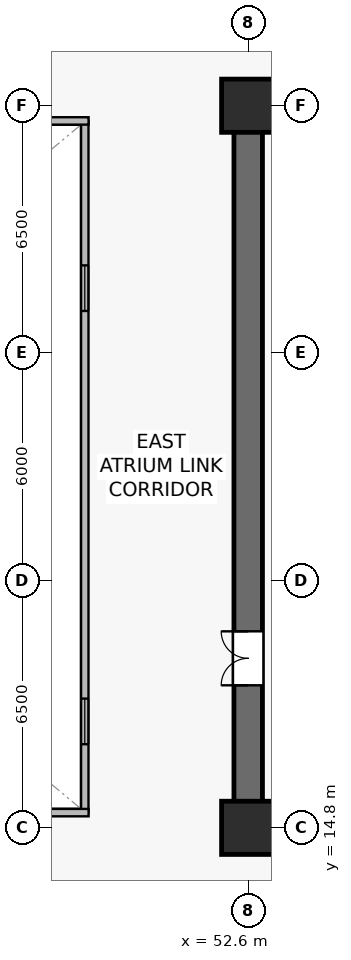
"""IFC4 building model, lengths in metres.
Left out: names, types, materials, properties, quantities, classifications, styles, units other than length and angle.
Written with IfcOpenShell. Run it as: python <this file> out.ifc"""

import sys

from ifc_helpers import new_model, si_unit, direction, frame, frame_2d, origin, origin_2d, place, context, subcontext, project, spatial, rectangle, extrude, source, transform, mapped, element, fill, save


model = new_model("IFC4")
c1 = context("Model", 3, precision=1e-05, world=origin(), true_north=direction((0.0, 1.0)))
c2 = subcontext(c1, "Body", "Model", "MODEL_VIEW")
j1 = project(units=[si_unit("LENGTHUNIT", "METRE"), si_unit("PLANEANGLEUNIT", "RADIAN")], contexts=[c1])
p1 = place(None, origin())
s1 = spatial("IfcSite", under=j1, at=p1, CompositionType="ELEMENT")
p2 = place(p1, origin())
s2 = spatial("IfcBuilding", under=s1, at=p2, CompositionType="ELEMENT")
p3 = place(p2, frame((0.0, 0.0, 53.9)))
s3 = spatial("IfcBuildingStorey", under=s2, at=p3, CompositionType="ELEMENT", Elevation=53.9)
p4 = place(p3, frame((52.225, 14.8, 0.0), z_axis=(0.0, 0.0, 1.0), x_axis=(1.0, 0.0, 0.0)))
e1 = element("IfcWall", 1, at=p4, inside=s3, PredefinedType="SHEAR", context=c2, shape_type="SweptSolid", body=[
    extrude(rectangle(XDim=15.55, YDim=0.75, at=frame_2d((7.775, 0.0))), origin(), (0.0, 0.0, 1.0), 3.78),
])
p5 = place(p3, frame((52.225, 33.8, 0.0), z_axis=(0.0, 0.0, 1.0), x_axis=(1.0, 0.0, 0.0)))
e2 = element("IfcWall", 2, at=p5, inside=s3, PredefinedType="SHEAR", context=c2, shape_type="SweptSolid", body=[
    extrude(rectangle(XDim=15.55, YDim=0.75, at=frame_2d((7.775, 0.0))), origin(), (0.0, 0.0, 1.0), 3.78),
])
p6 = place(p5, frame((6.175, 0.0, 0.0)))
e3 = element("IfcOpeningElement", 3, at=p6, cuts=e2, PredefinedType="OPENING", context=c2, shape_type="SweptSolid", body=[
    extrude(rectangle(XDim=0.95, YDim=2.15, at=frame_2d((0.475, 1.075))), frame((0.0, 0.385, 0.0), z_axis=(0.0, -1.0, 0.0), x_axis=(1.0, 0.0, 0.0)), (0.0, 0.0, 1.0), 0.77),
])
p7 = place(p5, frame((2.635, 0.0, 0.0)))
e4 = element("IfcOpeningElement", 4, at=p7, cuts=e2, PredefinedType="OPENING", context=c2, shape_type="SweptSolid", body=[
    extrude(rectangle(XDim=0.95, YDim=2.15, at=frame_2d((0.475, 1.075))), frame((0.0, 0.385, 0.0), z_axis=(0.0, -1.0, 0.0), x_axis=(1.0, 0.0, 0.0)), (0.0, 0.0, 1.0), 0.77),
])
p8 = place(p3, frame((52.6, 15.175, 0.0), z_axis=(0.0, 0.0, 1.0), x_axis=(0.0, 1.0, 0.0)))
e5 = element("IfcWall", 5, at=p8, inside=s3, PredefinedType="SHEAR", context=c2, shape_type="SweptSolid", body=[
    extrude(rectangle(XDim=18.25, YDim=0.75, at=frame_2d((9.125, 0.0))), origin(), (0.0, 0.0, 1.0), 3.78),
])
p9 = place(p8, frame((3.375, 0.0, 0.0)))
e6 = element("IfcOpeningElement", 6, at=p9, cuts=e5, PredefinedType="OPENING", context=c2, shape_type="SweptSolid", body=[
    extrude(rectangle(XDim=1.42, YDim=2.2, at=frame_2d((0.71, 1.1))), frame((0.0, 0.385, 0.0), z_axis=(0.0, -1.0, 0.0), x_axis=(1.0, 0.0, 0.0)), (0.0, 0.0, 1.0), 0.77),
])
m1 = source(origin(), c2, "Body", "SweptSolid", [
    extrude(rectangle(XDim=1.4, YDim=1.4, at=origin_2d()), origin(), (0.0, 0.0, 1.0), 4.1),
])
for number, where, z_axis, x_axis in (
    (7, (52.6, 14.8, 0.0), (0.0, 0.0, 1.0), (1.0, 0.0, 0.0)),
    (8, (52.6, 33.8, 0.0), (0.0, 0.0, 1.0), (1.0, 0.0, 0.0)),
):
    element("IfcColumn", number, at=place(p3, frame(where, z_axis=z_axis, x_axis=x_axis)), inside=s3, PredefinedType="COLUMN", context=c2, shape_type="MappedRepresentation", body=[
        mapped(m1, transform((0.0, 0.0, 0.0), scale=1.0)),
    ])
p10 = place(p3, frame((48.3, 15.2, 0.0), z_axis=(0.0, 0.0, 1.0), x_axis=(0.0, 1.0, 0.0)))
e9 = element("IfcWall", 9, at=p10, inside=s3, PredefinedType="SOLIDWALL", context=c2, shape_type="SweptSolid", body=[
    extrude(rectangle(XDim=18.2, YDim=0.195, at=frame_2d((9.1, 0.0))), origin(), (0.0, 0.0, 1.0), 3.78),
])
p11 = place(p10, frame((1.8, 0.0, 0.9)))
e10 = element("IfcOpeningElement", 10, at=p11, cuts=e9, PredefinedType="OPENING", context=c2, shape_type="SweptSolid", body=[
    extrude(rectangle(XDim=1.2, YDim=1.35, at=frame_2d((0.6, 0.675))), frame((0.0, 0.107, 0.0), z_axis=(0.0, -1.0, 0.0), x_axis=(1.0, 0.0, 0.0)), (0.0, 0.0, 1.0), 0.215),
])
p12 = place(p10, frame((13.2, 0.0, 0.9)))
e11 = element("IfcOpeningElement", 11, at=p12, cuts=e9, PredefinedType="OPENING", context=c2, shape_type="SweptSolid", body=[
    extrude(rectangle(XDim=1.2, YDim=1.35, at=frame_2d((0.6, 0.675))), frame((0.0, 0.107, 0.0), z_axis=(0.0, -1.0, 0.0), x_axis=(1.0, 0.0, 0.0)), (0.0, 0.0, 1.0), 0.215),
])
for number, where, z_axis, x_axis in (
    (12, (26.4, 15.2, 0.0), (0.0, 0.0, 1.0), (1.0, 0.0, 0.0)),
    (13, (26.4, 33.4, 0.0), (0.0, 0.0, 1.0), (1.0, 0.0, 0.0)),
):
    element("IfcWall", number, at=place(p3, frame(where, z_axis=z_axis, x_axis=x_axis)), inside=s3, PredefinedType="SOLIDWALL", context=c2, shape_type="SweptSolid", body=[
        extrude(rectangle(XDim=22.0, YDim=0.195, at=frame_2d((11.0, 0.0))), origin(), (0.0, 0.0, 1.0), 3.78),
    ])
m2 = source(origin(), c2, "Body", "SweptSolid", [
    extrude(rectangle(XDim=1.2, YDim=1.35, at=frame_2d((0.6, 0.675))), frame((0.0, 0.03, 0.0), z_axis=(0.0, -1.0, 0.0), x_axis=(1.0, 0.0, 0.0)), (0.0, 0.0, 1.0), 0.06),
])
p13 = place(p11, origin())
e14 = element("IfcWindow", 14, at=p13, inside=s3, PartitioningType="SINGLE_PANEL", PredefinedType="WINDOW", context=c2, shape_type="MappedRepresentation", body=[
    mapped(m2, transform((0.0, 0.0, 0.0), scale=1.0)),
])
fill(e10, e14)
p14 = place(p12, origin())
e15 = element("IfcWindow", 15, at=p14, inside=s3, PartitioningType="SINGLE_PANEL", PredefinedType="WINDOW", context=c2, shape_type="MappedRepresentation", body=[
    mapped(m2, transform((0.0, 0.0, 0.0), scale=1.0)),
])
fill(e11, e15)
m3 = source(origin(), c2, "Body", "SweptSolid", [
    extrude(rectangle(XDim=1.42, YDim=2.2, at=frame_2d((0.71, 1.1))), frame((0.0, 0.025, 0.0), z_axis=(0.0, -1.0, 0.0), x_axis=(1.0, 0.0, 0.0)), (0.0, 0.0, 1.0), 0.05),
])
p15 = place(p9, origin())
e16 = element("IfcDoor", 16, at=p15, inside=s3, OperationType="DOUBLE_DOOR_SINGLE_SWING", PredefinedType="DOOR", context=c2, shape_type="MappedRepresentation", body=[
    mapped(m3, transform((0.0, 0.0, 0.0), scale=1.0)),
])
fill(e6, e16)
save(model, sys.argv[1])
